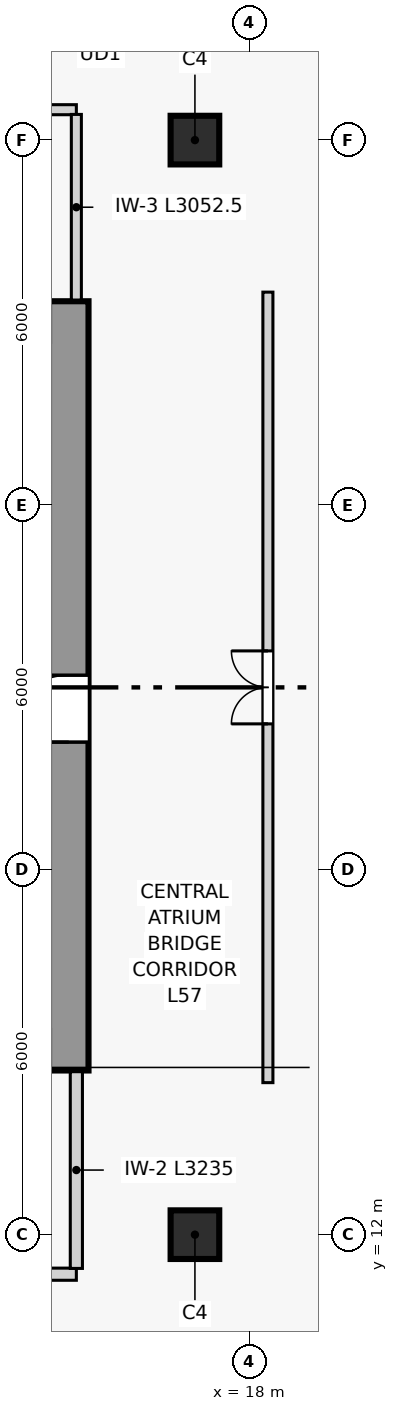
"""IFC4 building model, lengths in metres.
Left out: names, types, materials, properties, quantities, classifications, styles, units other than length and angle.
Written with IfcOpenShell. Run it as: python <this file> out.ifc"""

import sys

from ifc_helpers import new_model, si_unit, direction, frame, frame_2d, origin, origin_2d, place, context, subcontext, project, spatial, rectangle, extrude, source, transform, mapped, element, fill, save


model = new_model("IFC4")
c1 = context("Model", 3, precision=1e-05, world=origin(), true_north=direction((0.0, 1.0)))
c2 = subcontext(c1, "Body", "Model", "MODEL_VIEW")
j1 = project(units=[si_unit("LENGTHUNIT", "METRE"), si_unit("PLANEANGLEUNIT", "RADIAN")], contexts=[c1])
p1 = place(None, origin())
s1 = spatial("IfcSite", under=j1, at=p1, CompositionType="ELEMENT")
p2 = place(p1, origin())
s2 = spatial("IfcBuilding", under=s1, at=p2, CompositionType="ELEMENT")
p3 = place(p2, frame((0.0, 0.0, 216.9)))
s3 = spatial("IfcBuildingStorey", under=s2, at=p3, CompositionType="ELEMENT", Elevation=216.9)
p4 = place(p3, frame((15.025, 14.7, 0.0), z_axis=(0.0, 0.0, 1.0), x_axis=(0.0, 1.0, 0.0)))
e1 = element("IfcWall", 1, at=p4, inside=s3, PredefinedType="SHEAR", context=c2, shape_type="SweptSolid", body=[
    extrude(rectangle(XDim=12.65, YDim=0.65, at=frame_2d((6.325, 0.0))), origin(), (0.0, 0.0, 1.0), 3.6),
])
p5 = place(p4, frame((5.4, 0.0, 0.0)))
e2 = element("IfcOpeningElement", 2, at=p5, cuts=e1, PredefinedType="OPENING", context=c2, shape_type="SweptSolid", body=[
    extrude(rectangle(XDim=1.1, YDim=2.2, at=frame_2d((0.55, 1.1))), frame((0.0, 0.335, 0.0), z_axis=(0.0, -1.0, 0.0), x_axis=(1.0, 0.0, 0.0)), (0.0, 0.0, 1.0), 0.67),
])
m1 = source(origin(), c2, "Body", "SweptSolid", [
    extrude(rectangle(XDim=0.8, YDim=0.8, at=origin_2d()), origin(), (0.0, 0.0, 1.0), 3.6),
])
for number, where, z_axis, x_axis in (
    (3, (17.1, 12.0, 0.0), (0.0, 0.0, 1.0), (1.0, 0.0, 0.0)),
    (4, (17.1, 30.0, 0.0), (0.0, 0.0, 1.0), (1.0, 0.0, 0.0)),
):
    element("IfcColumn", number, at=place(p3, frame(where, z_axis=z_axis, x_axis=x_axis)), inside=s3, PredefinedType="COLUMN", context=c2, shape_type="MappedRepresentation", body=[
        mapped(m1, transform((0.0, 0.0, 0.0), scale=1.0)),
    ])
p6 = place(p3, frame((8.05, 11.35, 0.0), z_axis=(0.0, 0.0, 1.0), x_axis=(1.0, 0.0, 0.0)))
e5 = element("IfcWall", 5, at=p6, inside=s3, PredefinedType="PARTITIONING", context=c2, shape_type="SweptSolid", body=[
    extrude(rectangle(XDim=7.1, YDim=0.2, at=frame_2d((3.55, 0.0))), origin(), (0.0, 0.0, 1.0), 3.28),
])
p7 = place(p6, frame((2.846, 0.0, 0.0)))
e6 = element("IfcOpeningElement", 6, at=p7, cuts=e5, PredefinedType="OPENING", context=c2, shape_type="SweptSolid", body=[
    extrude(rectangle(XDim=1.2, YDim=2.2, at=frame_2d((0.6, 1.1))), frame((0.0, 0.11, 0.0), z_axis=(0.0, -1.0, 0.0), x_axis=(1.0, 0.0, 0.0)), (0.0, 0.0, 1.0), 0.22),
])
p8 = place(p3, frame((15.15, 11.445, 0.0), z_axis=(0.0, 0.0, 1.0), x_axis=(0.0, 1.0, 0.0)))
e7 = element("IfcWall", 7, at=p8, inside=s3, PredefinedType="PARTITIONING", context=c2, shape_type="SweptSolid", body=[
    extrude(rectangle(XDim=3.235, YDim=0.2, at=frame_2d((1.617, 0.0))), origin(), (0.0, 0.0, 1.0), 3.28),
])
p9 = place(p3, frame((8.05, 30.5, 0.0), z_axis=(0.0, 0.0, 1.0), x_axis=(1.0, 0.0, 0.0)))
e8 = element("IfcWall", 8, at=p9, inside=s3, PredefinedType="PARTITIONING", context=c2, shape_type="SweptSolid", body=[
    extrude(rectangle(XDim=7.1, YDim=0.165, at=frame_2d((3.55, 0.0))), origin(), (0.0, 0.0, 1.0), 3.28),
])
p10 = place(p9, frame((2.95, 0.0, 0.0)))
e9 = element("IfcOpeningElement", 9, at=p10, cuts=e8, PredefinedType="OPENING", context=c2, shape_type="SweptSolid", body=[
    extrude(rectangle(XDim=1.2, YDim=2.2, at=frame_2d((0.6, 1.1))), frame((0.0, 0.093, 0.0), z_axis=(0.0, -1.0, 0.0), x_axis=(1.0, 0.0, 0.0)), (0.0, 0.0, 1.0), 0.185),
])
p11 = place(p3, frame((15.15, 27.37, 0.0), z_axis=(0.0, 0.0, 1.0), x_axis=(0.0, 1.0, 0.0)))
e10 = element("IfcWall", 10, at=p11, inside=s3, PredefinedType="PARTITIONING", context=c2, shape_type="SweptSolid", body=[
    extrude(rectangle(XDim=3.052, YDim=0.165, at=frame_2d((1.526, 0.0))), origin(), (0.0, 0.0, 1.0), 3.28),
])
p12 = place(p3, frame((18.3, 14.5, 0.0), z_axis=(0.0, 0.0, 1.0), x_axis=(0.0, 1.0, 0.0)))
e11 = element("IfcWall", 11, at=p12, inside=s3, PredefinedType="PARTITIONING", context=c2, shape_type="SweptSolid", body=[
    extrude(rectangle(XDim=13.0, YDim=0.165, at=frame_2d((6.5, 0.0))), origin(), (0.0, 0.0, 1.0), 3.28),
])
p13 = place(p12, frame((5.9, 0.0, 0.0)))
e12 = element("IfcOpeningElement", 12, at=p13, cuts=e11, PredefinedType="OPENING", context=c2, shape_type="SweptSolid", body=[
    extrude(rectangle(XDim=1.2, YDim=2.2, at=frame_2d((0.6, 1.1))), frame((0.0, 0.093, 0.0), z_axis=(0.0, -1.0, 0.0), x_axis=(1.0, 0.0, 0.0)), (0.0, 0.0, 1.0), 0.185),
])
m2 = source(origin(), c2, "Body", "SweptSolid", [
    extrude(rectangle(XDim=1.1, YDim=2.2, at=frame_2d((0.55, 1.1))), frame((0.0, 0.025, 0.0), z_axis=(0.0, -1.0, 0.0), x_axis=(1.0, 0.0, 0.0)), (0.0, 0.0, 1.0), 0.05),
])
p14 = place(p5, origin())
e13 = element("IfcDoor", 13, at=p14, inside=s3, OperationType="SINGLE_SWING_LEFT", PredefinedType="DOOR", context=c2, shape_type="MappedRepresentation", body=[
    mapped(m2, transform((0.0, 0.0, 0.0), scale=1.0)),
])
fill(e2, e13)
m3 = source(origin(), c2, "Body", "SweptSolid", [
    extrude(rectangle(XDim=1.2, YDim=2.2, at=frame_2d((0.6, 1.1))), frame((0.0, 0.025, 0.0), z_axis=(0.0, -1.0, 0.0), x_axis=(1.0, 0.0, 0.0)), (0.0, 0.0, 1.0), 0.05),
])
p15 = place(p13, origin())
e14 = element("IfcDoor", 14, at=p15, inside=s3, OperationType="DOUBLE_DOOR_SINGLE_SWING", PredefinedType="DOOR", context=c2, shape_type="MappedRepresentation", body=[
    mapped(m3, transform((0.0, 0.0, 0.0), scale=1.0)),
])
fill(e12, e14)
save(model, sys.argv[1])
